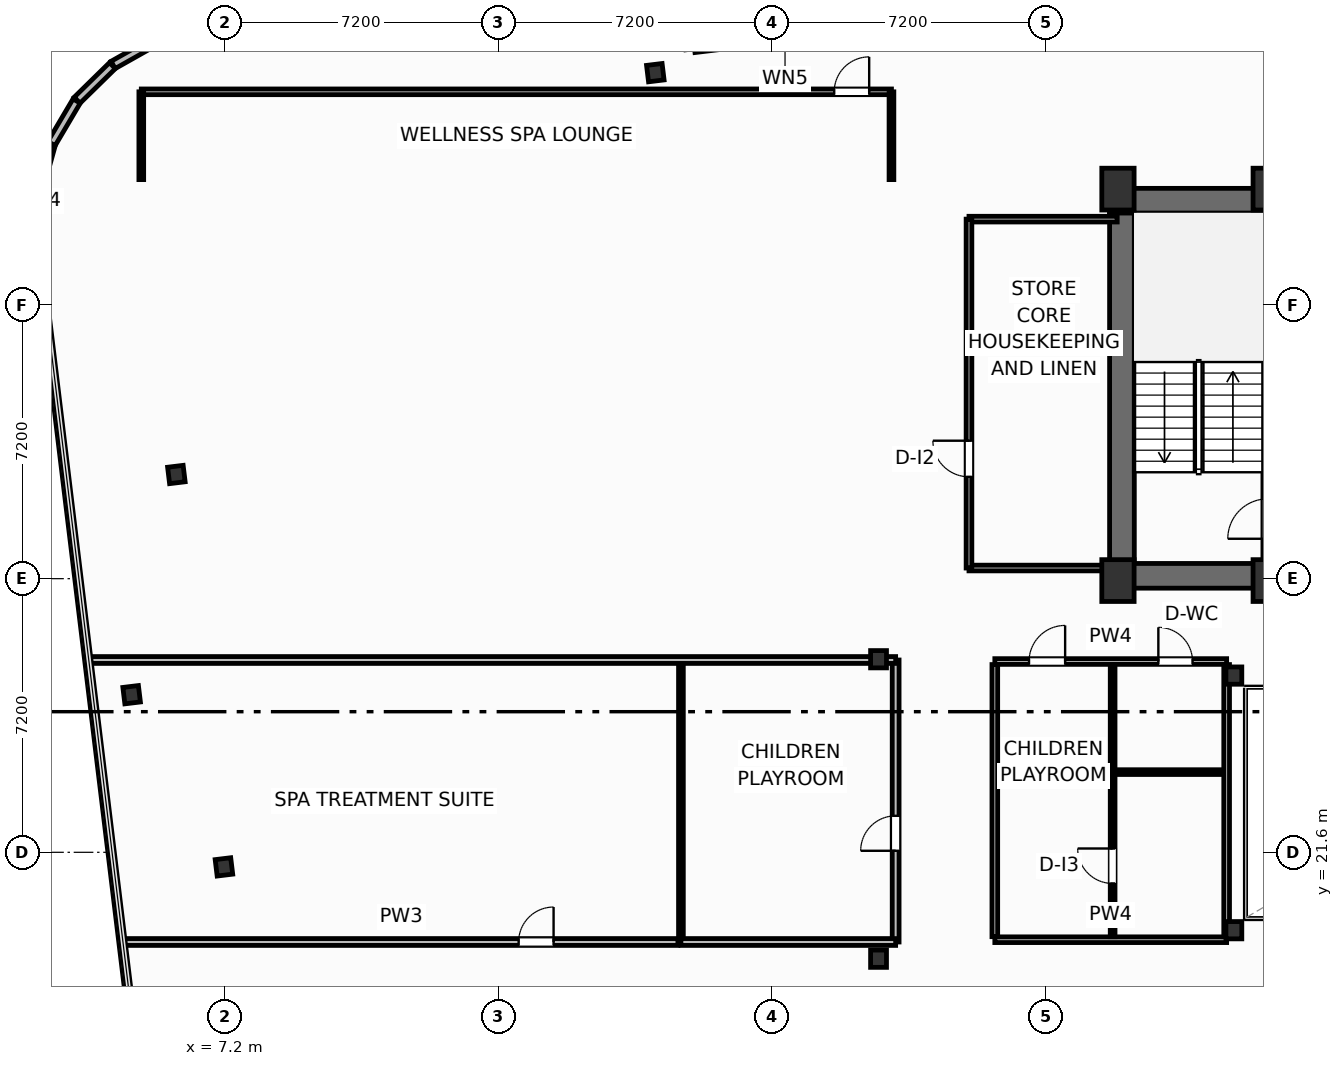
"""IFC4 building model, lengths in metres.
Left out: names, types, materials, properties, quantities, classifications, styles, units other than length and angle.
Written with IfcOpenShell. Run it as: python <this file> out.ifc"""

import sys

from ifc_helpers import new_model, si_unit, direction, frame, frame_2d, origin, origin_2d, place, context, subcontext, project, spatial, rectangle, i_section, extrude, element, fill, save


model = new_model("IFC4")
c1 = context("Model", 3, precision=1e-05, world=origin(), true_north=direction((0.0, 1.0)))
c2 = subcontext(c1, "Body", "Model", "MODEL_VIEW")
j1 = project(units=[si_unit("LENGTHUNIT", "METRE"), si_unit("PLANEANGLEUNIT", "RADIAN")], contexts=[c1])
p1 = place(None, origin())
s1 = spatial("IfcSite", under=j1, at=p1, CompositionType="ELEMENT")
p2 = place(p1, origin())
s2 = spatial("IfcBuilding", under=s1, at=p2, CompositionType="ELEMENT")
p3 = place(p2, frame((0.0, 0.0, 196.8)))
s3 = spatial("IfcBuildingStorey", under=s2, at=p3, CompositionType="ELEMENT", Elevation=196.8)
for number, where, z_axis, x_axis in (
    (1, (30.7, 28.75, 0.0), (0.0, 0.0, 1.0), (1.0, 0.0, 0.0)),
    (2, (34.68, 28.75, 0.0), (0.0, 0.0, 1.0), (1.0, 0.0, 0.0)),
    (3, (30.7, 39.05, 0.0), (0.0, 0.0, 1.0), (1.0, 0.0, 0.0)),
    (4, (34.68, 39.05, 0.0), (0.0, 0.0, 1.0), (1.0, 0.0, 0.0)),
):
    element("IfcColumn", number, at=place(p3, frame(where, z_axis=z_axis, x_axis=x_axis)), inside=s3, PredefinedType="COLUMN", context=c2, shape_type="SweptSolid", body=[
        extrude(rectangle(XDim=0.85, YDim=1.1, at=origin_2d()), origin(), (0.0, 0.0, 1.0), 3.7),
    ])
for number, where, z_axis, x_axis in (
    (5, (33.75, 19.55, 0.0), (0.0, 0.0, 1.0), (1.0, 0.0, 0.0)),
    (6, (33.75, 26.25, 0.0), (0.0, 0.0, 1.0), (1.0, 0.0, 0.0)),
    (7, (24.4, 18.8, 0.0), (0.0, 0.0, 1.0), (1.0, 0.0, 0.0)),
    (8, (24.4, 26.68, 0.0), (0.0, 0.0, 1.0), (1.0, 0.0, 0.0)),
):
    element("IfcColumn", number, at=place(p3, frame(where, z_axis=z_axis, x_axis=x_axis)), inside=s3, PredefinedType="COLUMN", context=c2, shape_type="SweptSolid", body=[
        extrude(i_section(OverallWidth=0.418, OverallDepth=0.455, WebThickness=0.042, FlangeThickness=0.068, FilletRadius=0.025, at=origin_2d()), origin(), (0.0, 0.0, 1.0), 3.7),
    ])
p4 = place(p3, frame((30.48, 38.745, 0.0), z_axis=(0.0, 0.0, 1.0), x_axis=(1.0, 0.0, 0.0)))
e9 = element("IfcWall", 9, at=p4, inside=s3, PredefinedType="SHEAR", context=c2, shape_type="SweptSolid", body=[
    extrude(rectangle(XDim=17.44, YDim=0.65, at=frame_2d((8.72, 0.0))), origin(), (0.0, 0.0, 1.0), 3.45),
])
p5 = place(p3, frame((30.805, 29.2, 0.0), z_axis=(0.0, 0.0, 1.0), x_axis=(0.0, 1.0, 0.0)))
e10 = element("IfcWall", 10, at=p5, inside=s3, PredefinedType="SHEAR", context=c2, shape_type="SweptSolid", body=[
    extrude(rectangle(XDim=9.22, YDim=0.65, at=frame_2d((4.61, 0.0))), origin(), (0.0, 0.0, 1.0), 3.45),
])
p6 = place(p3, frame((30.48, 28.875, 0.0), z_axis=(0.0, 0.0, 1.0), x_axis=(1.0, 0.0, 0.0)))
e11 = element("IfcWall", 11, at=p6, inside=s3, PredefinedType="SHEAR", context=c2, shape_type="SweptSolid", body=[
    extrude(rectangle(XDim=4.32, YDim=0.65, at=frame_2d((2.16, 0.0))), origin(), (0.0, 0.0, 1.0), 3.45),
])
p7 = place(p3, frame((34.64, 29.2, 0.0), z_axis=(0.0, 0.0, 1.0), x_axis=(0.0, 1.0, 0.0)))
e12 = element("IfcWall", 12, at=p7, inside=s3, PredefinedType="SHEAR", context=c2, shape_type="SweptSolid", body=[
    extrude(rectangle(XDim=9.22, YDim=0.25, at=frame_2d((4.61, 0.0))), origin(), (0.0, 0.0, 1.0), 3.45),
])
p8 = place(p7, frame((0.65, 0.0, 0.0)))
e13 = element("IfcOpeningElement", 13, at=p8, cuts=e12, PredefinedType="OPENING", context=c2, shape_type="SweptSolid", body=[
    extrude(rectangle(XDim=1.05, YDim=2.15, at=frame_2d((0.525, 1.075))), frame((0.0, 0.135, 0.0), z_axis=(0.0, -1.0, 0.0), x_axis=(1.0, 0.0, 0.0)), (0.0, 0.0, 1.0), 0.27),
])
for number, where, z_axis, x_axis in (
    (14, (18.526, 42.114, 0.0), (0.0, 0.0, 1.0), (0.993, 0.12, 0.0)),
    (15, (5.923, 31.541, 0.0), (0.0, 0.0, 1.0), (0.993, 0.12, 0.0)),
    (16, (4.746, 25.747, 0.0), (0.0, 0.0, 1.0), (0.993, 0.12, 0.0)),
    (17, (7.175, 21.216, 0.0), (0.0, 0.0, 1.0), (0.993, 0.12, 0.0)),
):
    element("IfcColumn", number, at=place(p3, frame(where, z_axis=z_axis, x_axis=x_axis)), inside=s3, PredefinedType="COLUMN", context=c2, shape_type="SweptSolid", body=[
        extrude(i_section(OverallWidth=0.412, OverallDepth=0.435, WebThickness=0.036, FlangeThickness=0.057, FilletRadius=0.025, at=origin_2d()), origin(), (0.0, 0.0, 1.0), 3.7),
    ])
p9 = place(p3, frame((19.557, 42.753, 0.0), z_axis=(0.0, 0.0, 1.0), x_axis=(0.992729951822, 0.120362962556, 0.0)))
e18 = element("IfcWall", 18, at=p9, inside=s3, PredefinedType="SOLIDWALL", context=c2, shape_type="SweptSolid", body=[
    extrude(rectangle(XDim=6.0, YDim=0.22, at=frame_2d((3.0, 0.0))), origin(), (0.0, 0.0, 1.0), 2.73),
])
p10 = place(p9, frame((3.5, 0.0, 0.0)))
e19 = element("IfcOpeningElement", 19, at=p10, cuts=e18, PredefinedType="OPENING", context=c2, shape_type="SweptSolid", body=[
    extrude(rectangle(XDim=2.1, YDim=2.3, at=frame_2d((1.05, 1.15))), frame((0.0, 0.12, 0.0), z_axis=(0.0, -1.0, 0.0), x_axis=(1.0, 0.0, 0.0)), (0.0, 0.0, 1.0), 0.24),
])
p11 = place(p9, frame((0.55, 0.0, 0.75)))
e20 = element("IfcOpeningElement", 20, at=p11, cuts=e18, PredefinedType="OPENING", context=c2, shape_type="SweptSolid", body=[
    extrude(rectangle(XDim=1.85, YDim=1.75, at=frame_2d((0.925, 0.875))), frame((0.0, 0.12, 0.0), z_axis=(0.0, -1.0, 0.0), x_axis=(1.0, 0.0, 0.0)), (0.0, 0.0, 1.0), 0.24),
])
for number, where, z_axis, x_axis in (
    (21, (5.392, 42.956, 0.0), (0.0, 0.0, 1.0), (-0.871, -0.491, 0.0)),
    (22, (4.241, 42.3, 0.0), (0.0, 0.0, 1.0), (-0.714, -0.7, 0.0)),
):
    element("IfcWall", number, at=place(p3, frame(where, z_axis=z_axis, x_axis=x_axis)), inside=s3, PredefinedType="SOLIDWALL", context=c2, shape_type="SweptSolid", body=[
        extrude(rectangle(XDim=1.301, YDim=0.22, at=frame_2d((0.65, 0.0))), origin(), (0.0, 0.0, 1.0), 2.73),
    ])
p12 = place(p3, frame((3.299, 41.368, 0.0), z_axis=(0.0, 0.0, 1.0), x_axis=(-0.508716668029, -0.860933999601, 0.0)))
e23 = element("IfcWall", 23, at=p12, inside=s3, PredefinedType="SOLIDWALL", context=c2, shape_type="SweptSolid", body=[
    extrude(rectangle(XDim=1.301, YDim=0.22, at=frame_2d((0.65, 0.0))), origin(), (0.0, 0.0, 1.0), 2.73),
])
p13 = place(p3, frame((2.63, 40.224, 0.0), z_axis=(0.0, 0.0, 1.0), x_axis=(-0.26876657226, -0.963205341366, 0.0)))
e24 = element("IfcWall", 24, at=p13, inside=s3, PredefinedType="SOLIDWALL", context=c2, shape_type="SweptSolid", body=[
    extrude(rectangle(XDim=1.301, YDim=0.22, at=frame_2d((0.65, 0.0))), origin(), (0.0, 0.0, 1.0), 2.73),
])
p14 = place(p3, frame((5.0, 41.61, 0.0), z_axis=(0.0, 0.0, 1.0), x_axis=(1.0, 0.0, 0.0)))
e25 = element("IfcWall", 25, at=p14, inside=s3, PredefinedType="PARTITIONING", context=c2, shape_type="SweptSolid", body=[
    extrude(rectangle(XDim=19.74, YDim=0.15, at=frame_2d((9.87, 0.0))), origin(), (0.0, 0.0, 1.0), 2.662),
])
p15 = place(p14, frame((18.234, 0.0, 0.0)))
e26 = element("IfcOpeningElement", 26, at=p15, cuts=e25, PredefinedType="OPENING", context=c2, shape_type="SweptSolid", body=[
    extrude(rectangle(XDim=0.92, YDim=2.05, at=frame_2d((0.46, 1.025))), frame((0.0, 0.085, 0.0), z_axis=(0.0, -1.0, 0.0), x_axis=(1.0, 0.0, 0.0)), (0.0, 0.0, 1.0), 0.17),
])
for number, where, z_axis, x_axis in (
    (27, (5.0, 39.3, 0.0), (0.0, 0.0, 1.0), (0.0, 1.0, 0.0)),
    (28, (24.74, 39.3, 0.0), (0.0, 0.0, 1.0), (0.0, 1.0, 0.0)),
):
    element("IfcWall", number, at=place(p3, frame(where, z_axis=z_axis, x_axis=x_axis)), inside=s3, PredefinedType="PARTITIONING", context=c2, shape_type="SweptSolid", body=[
        extrude(rectangle(XDim=2.31, YDim=0.125, at=frame_2d((1.155, 0.0))), origin(), (0.0, 0.0, 1.0), 3.45),
    ])
p16 = place(p3, frame((4.557, 19.24, 0.0), z_axis=(0.0, 0.0, 1.0), x_axis=(1.0, 0.0, 0.0)))
e29 = element("IfcWall", 29, at=p16, inside=s3, PredefinedType="PARTITIONING", context=c2, shape_type="SweptSolid", body=[
    extrude(rectangle(XDim=14.563, YDim=0.18, at=frame_2d((7.281, 0.0))), origin(), (0.0, 0.0, 1.0), 3.45),
])
p17 = place(p16, frame((10.372, 0.0, 0.0)))
e30 = element("IfcOpeningElement", 30, at=p17, cuts=e29, PredefinedType="OPENING", context=c2, shape_type="SweptSolid", body=[
    extrude(rectangle(XDim=0.92, YDim=2.05, at=frame_2d((0.46, 1.025))), frame((0.0, 0.1, 0.0), z_axis=(0.0, -1.0, 0.0), x_axis=(1.0, 0.0, 0.0)), (0.0, 0.0, 1.0), 0.2),
])
p18 = place(p3, frame((24.85, 19.24, 0.0), z_axis=(0.0, 0.0, 1.0), x_axis=(0.0, 1.0, 0.0)))
e31 = element("IfcWall", 31, at=p18, inside=s3, PredefinedType="PARTITIONING", context=c2, shape_type="SweptSolid", body=[
    extrude(rectangle(XDim=7.42, YDim=0.18, at=frame_2d((3.71, 0.0))), origin(), (0.0, 0.0, 1.0), 3.45),
])
p19 = place(p18, frame((2.4, 0.0, 0.0)))
e32 = element("IfcOpeningElement", 32, at=p19, cuts=e31, PredefinedType="OPENING", context=c2, shape_type="SweptSolid", body=[
    extrude(rectangle(XDim=0.92, YDim=2.05, at=frame_2d((0.46, 1.025))), frame((0.0, 0.1, 0.0), z_axis=(0.0, -1.0, 0.0), x_axis=(1.0, 0.0, 0.0)), (0.0, 0.0, 1.0), 0.2),
])
p20 = place(p3, frame((19.2, 19.24, 0.0), z_axis=(0.0, 0.0, 1.0), x_axis=(0.0, 1.0, 0.0)))
e33 = element("IfcWall", 33, at=p20, inside=s3, PredefinedType="PARTITIONING", context=c2, shape_type="SweptSolid", body=[
    extrude(rectangle(XDim=7.42, YDim=0.125, at=frame_2d((3.71, 0.0))), origin(), (0.0, 0.0, 1.0), 3.45),
])
p21 = place(p3, frame((19.2, 19.24, 0.0), z_axis=(0.0, 0.0, 1.0), x_axis=(1.0, 0.0, 0.0)))
e34 = element("IfcWall", 34, at=p21, inside=s3, PredefinedType="PARTITIONING", context=c2, shape_type="SweptSolid", body=[
    extrude(rectangle(XDim=5.65, YDim=0.18, at=frame_2d((2.825, 0.0))), origin(), (0.0, 0.0, 1.0), 3.45),
])
p22 = place(p3, frame((3.658, 26.66, 0.0), z_axis=(0.0, 0.0, 1.0), x_axis=(1.0, 0.0, 0.0)))
e35 = element("IfcWall", 35, at=p22, inside=s3, PredefinedType="PARTITIONING", context=c2, shape_type="SweptSolid", body=[
    extrude(rectangle(XDim=21.192, YDim=0.18, at=frame_2d((10.596, 0.0))), origin(), (0.0, 0.0, 1.0), 2.662),
])
p23 = place(p3, frame((27.46, 26.62, 0.0), z_axis=(0.0, 0.0, 1.0), x_axis=(1.0, 0.0, 0.0)))
e36 = element("IfcWall", 36, at=p23, inside=s3, PredefinedType="PARTITIONING", context=c2, shape_type="SweptSolid", body=[
    extrude(rectangle(XDim=6.1, YDim=0.15, at=frame_2d((3.05, 0.0))), origin(), (0.0, 0.0, 1.0), 2.662),
])
p24 = place(p23, frame((0.9, 0.0, 0.0)))
e37 = element("IfcOpeningElement", 37, at=p24, cuts=e36, PredefinedType="OPENING", context=c2, shape_type="SweptSolid", body=[
    extrude(rectangle(XDim=0.95, YDim=2.05, at=frame_2d((0.475, 1.025))), frame((0.0, 0.085, 0.0), z_axis=(0.0, -1.0, 0.0), x_axis=(1.0, 0.0, 0.0)), (0.0, 0.0, 1.0), 0.17),
])
p25 = place(p23, frame((4.303, 0.0, 0.0)))
e38 = element("IfcOpeningElement", 38, at=p25, cuts=e36, PredefinedType="OPENING", context=c2, shape_type="SweptSolid", body=[
    extrude(rectangle(XDim=0.9, YDim=2.05, at=frame_2d((0.45, 1.025))), frame((0.0, 0.085, 0.0), z_axis=(0.0, -1.0, 0.0), x_axis=(1.0, 0.0, 0.0)), (0.0, 0.0, 1.0), 0.17),
])
p26 = place(p3, frame((27.46, 19.3, 0.0), z_axis=(0.0, 0.0, 1.0), x_axis=(1.0, 0.0, 0.0)))
e39 = element("IfcWall", 39, at=p26, inside=s3, PredefinedType="PARTITIONING", context=c2, shape_type="SweptSolid", body=[
    extrude(rectangle(XDim=6.1, YDim=0.15, at=frame_2d((3.05, 0.0))), origin(), (0.0, 0.0, 1.0), 2.662),
])
p27 = place(p3, frame((30.56, 19.38, 0.0), z_axis=(0.0, 0.0, 1.0), x_axis=(0.0, 1.0, 0.0)))
e40 = element("IfcWall", 40, at=p27, inside=s3, PredefinedType="PARTITIONING", context=c2, shape_type="SweptSolid", body=[
    extrude(rectangle(XDim=7.16, YDim=0.125, at=frame_2d((3.58, 0.0))), origin(), (0.0, 0.0, 1.0), 3.45),
])
p28 = place(p27, frame((1.4, 0.0, 0.0)))
e41 = element("IfcOpeningElement", 41, at=p28, cuts=e40, PredefinedType="OPENING", context=c2, shape_type="SweptSolid", body=[
    extrude(rectangle(XDim=0.92, YDim=2.05, at=frame_2d((0.46, 1.025))), frame((0.0, 0.073, 0.0), z_axis=(0.0, -1.0, 0.0), x_axis=(1.0, 0.0, 0.0)), (0.0, 0.0, 1.0), 0.145),
])
p29 = place(p3, frame((30.64, 23.71, 0.0), z_axis=(0.0, 0.0, 1.0), x_axis=(1.0, 0.0, 0.0)))
e42 = element("IfcWall", 42, at=p29, inside=s3, PredefinedType="PARTITIONING", context=c2, shape_type="SweptSolid", body=[
    extrude(rectangle(XDim=2.88, YDim=0.125, at=frame_2d((1.44, 0.0))), origin(), (0.0, 0.0, 1.0), 3.45),
])
p30 = place(p3, frame((27.46, 19.38, 0.0), z_axis=(0.0, 0.0, 1.0), x_axis=(0.0, 1.0, 0.0)))
e43 = element("IfcWall", 43, at=p30, inside=s3, PredefinedType="PARTITIONING", context=c2, shape_type="SweptSolid", body=[
    extrude(rectangle(XDim=7.16, YDim=0.15, at=frame_2d((3.58, 0.0))), origin(), (0.0, 0.0, 1.0), 3.45),
])
p31 = place(p3, frame((33.56, 19.38, 0.0), z_axis=(0.0, 0.0, 1.0), x_axis=(0.0, 1.0, 0.0)))
e44 = element("IfcWall", 44, at=p31, inside=s3, PredefinedType="PARTITIONING", context=c2, shape_type="SweptSolid", body=[
    extrude(rectangle(XDim=7.16, YDim=0.15, at=frame_2d((3.58, 0.0))), origin(), (0.0, 0.0, 1.0), 2.824),
])
p32 = place(p3, frame((26.78, 29.08, 0.0), z_axis=(0.0, 0.0, 1.0), x_axis=(1.0, 0.0, 0.0)))
e45 = element("IfcWall", 45, at=p32, inside=s3, PredefinedType="PARTITIONING", context=c2, shape_type="SweptSolid", body=[
    extrude(rectangle(XDim=3.7, YDim=0.15, at=frame_2d((1.85, 0.0))), origin(), (0.0, 0.0, 1.0), 3.45),
])
p33 = place(p3, frame((26.78, 38.26, 0.0), z_axis=(0.0, 0.0, 1.0), x_axis=(1.0, 0.0, 0.0)))
e46 = element("IfcWall", 46, at=p33, inside=s3, PredefinedType="PARTITIONING", context=c2, shape_type="SweptSolid", body=[
    extrude(rectangle(XDim=3.9, YDim=0.15, at=frame_2d((1.95, 0.0))), origin(), (0.0, 0.0, 1.0), 3.45),
])
p34 = place(p3, frame((26.78, 29.08, 0.0), z_axis=(0.0, 0.0, 1.0), x_axis=(0.0, 1.0, 0.0)))
e47 = element("IfcWall", 47, at=p34, inside=s3, PredefinedType="PARTITIONING", context=c2, shape_type="SweptSolid", body=[
    extrude(rectangle(XDim=9.18, YDim=0.15, at=frame_2d((4.59, 0.0))), origin(), (0.0, 0.0, 1.0), 3.45),
])
p35 = place(p34, frame((2.4, 0.0, 0.0)))
e48 = element("IfcOpeningElement", 48, at=p35, cuts=e47, PredefinedType="OPENING", context=c2, shape_type="SweptSolid", body=[
    extrude(rectangle(XDim=0.95, YDim=2.05, at=frame_2d((0.475, 1.025))), frame((0.0, 0.085, 0.0), z_axis=(0.0, -1.0, 0.0), x_axis=(1.0, 0.0, 0.0)), (0.0, 0.0, 1.0), 0.17),
])
p36 = place(p15, origin())
e49 = element("IfcDoor", 49, at=p36, inside=s3, OperationType="SINGLE_SWING_RIGHT", PredefinedType="DOOR", context=c2, shape_type="SweptSolid", body=[
    extrude(rectangle(XDim=0.92, YDim=2.05, at=frame_2d((0.46, 1.025))), frame((0.0, 0.025, 0.0), z_axis=(0.0, -1.0, 0.0), x_axis=(1.0, 0.0, 0.0)), (0.0, 0.0, 1.0), 0.05),
])
fill(e26, e49)
p37 = place(p17, origin())
e50 = element("IfcDoor", 50, at=p37, inside=s3, OperationType="SINGLE_SWING_RIGHT", PredefinedType="DOOR", context=c2, shape_type="SweptSolid", body=[
    extrude(rectangle(XDim=0.92, YDim=2.05, at=frame_2d((0.46, 1.025))), frame((0.0, 0.025, 0.0), z_axis=(0.0, -1.0, 0.0), x_axis=(1.0, 0.0, 0.0)), (0.0, 0.0, 1.0), 0.05),
])
fill(e30, e50)
p38 = place(p19, origin())
e51 = element("IfcDoor", 51, at=p38, inside=s3, OperationType="SINGLE_SWING_LEFT", PredefinedType="DOOR", context=c2, shape_type="SweptSolid", body=[
    extrude(rectangle(XDim=0.92, YDim=2.05, at=frame_2d((0.46, 1.025))), frame((0.0, 0.025, 0.0), z_axis=(0.0, -1.0, 0.0), x_axis=(1.0, 0.0, 0.0)), (0.0, 0.0, 1.0), 0.05),
])
fill(e32, e51)
p39 = place(p24, origin())
e52 = element("IfcDoor", 52, at=p39, inside=s3, OperationType="SINGLE_SWING_RIGHT", PredefinedType="DOOR", context=c2, shape_type="SweptSolid", body=[
    extrude(rectangle(XDim=0.95, YDim=2.05, at=frame_2d((0.475, 1.025))), frame((0.0, 0.025, 0.0), z_axis=(0.0, -1.0, 0.0), x_axis=(1.0, 0.0, 0.0)), (0.0, 0.0, 1.0), 0.05),
])
fill(e37, e52)
p40 = place(p25, origin())
e53 = element("IfcDoor", 53, at=p40, inside=s3, OperationType="SINGLE_SWING_LEFT", PredefinedType="DOOR", context=c2, shape_type="SweptSolid", body=[
    extrude(rectangle(XDim=0.9, YDim=2.05, at=frame_2d((0.45, 1.025))), frame((0.0, 0.025, 0.0), z_axis=(0.0, -1.0, 0.0), x_axis=(1.0, 0.0, 0.0)), (0.0, 0.0, 1.0), 0.05),
])
fill(e38, e53)
p41 = place(p28, origin())
e54 = element("IfcDoor", 54, at=p41, inside=s3, OperationType="SINGLE_SWING_RIGHT", PredefinedType="DOOR", context=c2, shape_type="SweptSolid", body=[
    extrude(rectangle(XDim=0.92, YDim=2.05, at=frame_2d((0.46, 1.025))), frame((0.0, 0.025, 0.0), z_axis=(0.0, -1.0, 0.0), x_axis=(1.0, 0.0, 0.0)), (0.0, 0.0, 1.0), 0.05),
])
fill(e41, e54)
p42 = place(p35, origin())
e55 = element("IfcDoor", 55, at=p42, inside=s3, OperationType="SINGLE_SWING_RIGHT", PredefinedType="DOOR", context=c2, shape_type="SweptSolid", body=[
    extrude(rectangle(XDim=0.95, YDim=2.05, at=frame_2d((0.475, 1.025))), frame((0.0, 0.025, 0.0), z_axis=(0.0, -1.0, 0.0), x_axis=(1.0, 0.0, 0.0)), (0.0, 0.0, 1.0), 0.05),
])
fill(e48, e55)
save(model, sys.argv[1])
